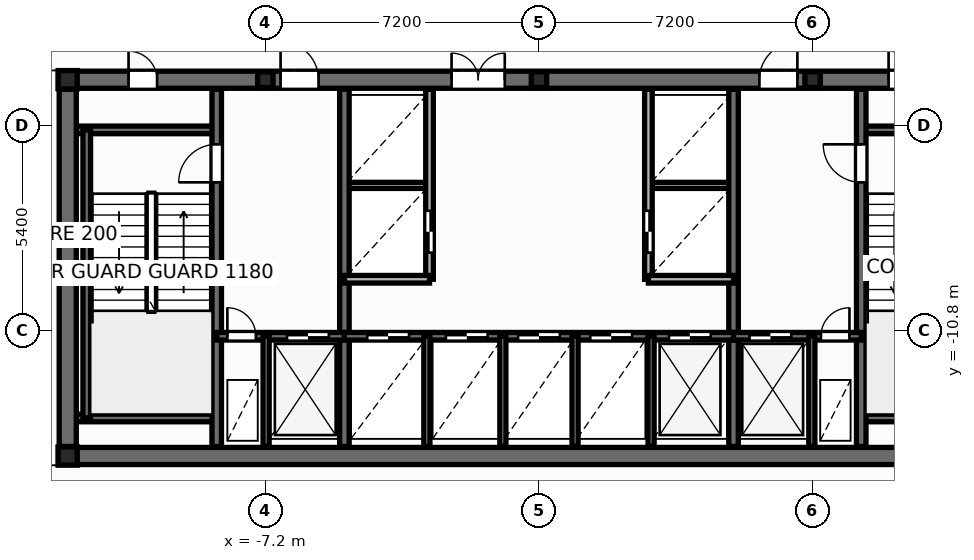
"""IFC4 building model, lengths in metres.
Left out: names, types, materials, properties, quantities, classifications, styles, units other than length and angle.
Written with IfcOpenShell. Run it as: python <this file> out.ifc"""

import sys

from ifc_helpers import new_model, si_unit, direction, frame, frame_2d, origin, origin_2d, place, context, subcontext, project, spatial, rectangle, i_section, extrude, element, fill, save


model = new_model("IFC4")
c1 = context("Model", 3, precision=1e-05, world=origin(), true_north=direction((0.0, 1.0)))
c2 = subcontext(c1, "Body", "Model", "MODEL_VIEW")
j1 = project(units=[si_unit("LENGTHUNIT", "METRE"), si_unit("PLANEANGLEUNIT", "RADIAN")], contexts=[c1])
p1 = place(None, origin())
s1 = spatial("IfcSite", under=j1, at=p1, CompositionType="ELEMENT")
p2 = place(p1, origin())
s2 = spatial("IfcBuilding", under=s1, at=p2, CompositionType="ELEMENT")
p3 = place(p2, frame((0.0, 0.0, 5.4)))
s3 = spatial("IfcBuildingStorey", under=s2, at=p3, CompositionType="ELEMENT", Elevation=5.4)
for number, where, z_axis, x_axis in (
    (1, (-12.4, -14.1, 0.0), (0.0, 0.0, 1.0), (1.0, 0.0, 0.0)),
    (2, (-12.4, -4.2, 0.0), (0.0, 0.0, 1.0), (1.0, 0.0, 0.0)),
):
    element("IfcColumn", number, at=place(p3, frame(where, z_axis=z_axis, x_axis=x_axis)), inside=s3, PredefinedType="COLUMN", context=c2, shape_type="SweptSolid", body=[
        extrude(i_section(OverallWidth=0.5, OverallDepth=0.482, WebThickness=0.04, FlangeThickness=0.045, at=origin_2d()), origin(), (0.0, 0.0, 1.0), 4.5),
    ])
for number, where, z_axis, x_axis in (
    (3, (-7.2, -4.2, 0.0), (0.0, 0.0, 1.0), (1.0, 0.0, 0.0)),
    (4, (0.0, -4.2, 0.0), (0.0, 0.0, 1.0), (1.0, 0.0, 0.0)),
    (5, (7.2, -4.2, 0.0), (0.0, 0.0, 1.0), (1.0, 0.0, 0.0)),
):
    element("IfcColumn", number, at=place(p3, frame(where, z_axis=z_axis, x_axis=x_axis)), inside=s3, PredefinedType="PILASTER", context=c2, shape_type="SweptSolid", body=[
        extrude(i_section(OverallWidth=0.405, OverallDepth=0.414, WebThickness=0.022, FlangeThickness=0.032, at=origin_2d()), origin(), (0.0, 0.0, 1.0), 4.5),
    ])
for number, where, z_axis, x_axis in (
    (6, (-5.12, -6.98, 0.0), (0.0, 0.0, 1.0), (1.0, 0.0, 0.0)),
    (7, (2.88, -6.98, 0.0), (0.0, 0.0, 1.0), (1.0, 0.0, 0.0)),
):
    element("IfcWall", number, at=place(p3, frame(where, z_axis=z_axis, x_axis=x_axis)), inside=s3, PredefinedType="PARTITIONING", context=c2, shape_type="SweptSolid", body=[
        extrude(rectangle(XDim=2.24, YDim=0.16, at=frame_2d((1.12, 0.0))), origin(), (0.0, 0.0, 1.0), 4.22),
    ])
p4 = place(p3, frame((-12.65, -14.1, 0.0), z_axis=(0.0, 0.0, 1.0), x_axis=(1.0, 0.0, 0.0)))
e8 = element("IfcWall", 8, at=p4, inside=s3, PredefinedType="SHEAR", context=c2, shape_type="SweptSolid", body=[
    extrude(rectangle(XDim=25.3, YDim=0.45, at=frame_2d((12.65, 0.0))), origin(), (0.0, 0.0, 1.0), 4.5),
])
p5 = place(p3, frame((-12.65, -4.2, 0.0), z_axis=(0.0, 0.0, 1.0), x_axis=(1.0, 0.0, 0.0)))
e9 = element("IfcWall", 9, at=p5, inside=s3, PredefinedType="SHEAR", context=c2, shape_type="SweptSolid", body=[
    extrude(rectangle(XDim=25.3, YDim=0.45, at=frame_2d((12.65, 0.0))), origin(), (0.0, 0.0, 1.0), 4.5),
])
p6 = place(p5, frame((1.85, 0.0, 0.0)))
e10 = element("IfcOpeningElement", 10, at=p6, cuts=e9, PredefinedType="OPENING", context=c2, shape_type="SweptSolid", body=[
    extrude(rectangle(XDim=0.756, YDim=2.054, at=frame_2d((0.375, 1.027))), frame((0.0, 0.235, 0.0), z_axis=(0.0, -1.0, 0.0), x_axis=(1.0, 0.0, 0.0)), (0.0, 0.0, 1.0), 0.47),
])
p7 = place(p5, frame((21.85, 0.0, 0.0)))
e11 = element("IfcOpeningElement", 11, at=p7, cuts=e9, PredefinedType="OPENING", context=c2, shape_type="SweptSolid", body=[
    extrude(rectangle(XDim=0.756, YDim=2.054, at=frame_2d((0.375, 1.027))), frame((0.0, 0.235, 0.0), z_axis=(0.0, -1.0, 0.0), x_axis=(1.0, 0.0, 0.0)), (0.0, 0.0, 1.0), 0.47),
])
p8 = place(p5, frame((23.5, 0.0, 0.0)))
e12 = element("IfcOpeningElement", 12, at=p8, cuts=e9, PredefinedType="OPENING", context=c2, shape_type="SweptSolid", body=[
    extrude(rectangle(XDim=0.756, YDim=2.054, at=frame_2d((0.375, 1.027))), frame((0.0, 0.235, 0.0), z_axis=(0.0, -1.0, 0.0), x_axis=(1.0, 0.0, 0.0)), (0.0, 0.0, 1.0), 0.47),
])
p9 = place(p5, frame((5.85, 0.0, 0.0)))
e13 = element("IfcOpeningElement", 13, at=p9, cuts=e9, PredefinedType="OPENING", context=c2, shape_type="SweptSolid", body=[
    extrude(rectangle(XDim=1.006, YDim=2.104, at=frame_2d((0.5, 1.052))), frame((0.0, 0.235, 0.0), z_axis=(0.0, -1.0, 0.0), x_axis=(1.0, 0.0, 0.0)), (0.0, 0.0, 1.0), 0.47),
])
p10 = place(p5, frame((10.35, 0.0, 0.0)))
e14 = element("IfcOpeningElement", 14, at=p10, cuts=e9, PredefinedType="OPENING", context=c2, shape_type="SweptSolid", body=[
    extrude(rectangle(XDim=1.406, YDim=2.154, at=frame_2d((0.7, 1.077))), frame((0.0, 0.235, 0.0), z_axis=(0.0, -1.0, 0.0), x_axis=(1.0, 0.0, 0.0)), (0.0, 0.0, 1.0), 0.47),
])
p11 = place(p5, frame((18.45, 0.0, 0.0)))
e15 = element("IfcOpeningElement", 15, at=p11, cuts=e9, PredefinedType="OPENING", context=c2, shape_type="SweptSolid", body=[
    extrude(rectangle(XDim=1.006, YDim=2.104, at=frame_2d((0.5, 1.052))), frame((0.0, 0.235, 0.0), z_axis=(0.0, -1.0, 0.0), x_axis=(1.0, 0.0, 0.0)), (0.0, 0.0, 1.0), 0.47),
])
for number, where, z_axis, x_axis in (
    (16, (-12.35, -5.52, 0.0), (0.0, 0.0, 1.0), (1.0, 0.0, 0.0)),
    (17, (-12.35, -13.1, 0.0), (0.0, 0.0, 1.0), (1.0, 0.0, 0.0)),
):
    element("IfcWall", number, at=place(p3, frame(where, z_axis=z_axis, x_axis=x_axis)), inside=s3, PredefinedType="SOLIDWALL", context=c2, shape_type="SweptSolid", body=[
        extrude(rectangle(XDim=3.87, YDim=0.2, at=frame_2d((1.935, 0.0))), origin(), (0.0, 0.0, 1.0), 4.5),
    ])
p12 = place(p3, frame((-11.9, -13.1, 0.0), z_axis=(0.0, 0.0, 1.0), x_axis=(0.0, 1.0, 0.0)))
e18 = element("IfcWall", 18, at=p12, inside=s3, PredefinedType="SOLIDWALL", context=c2, shape_type="SweptSolid", body=[
    extrude(rectangle(XDim=7.58, YDim=0.2, at=frame_2d((3.79, 0.0))), origin(), (0.0, 0.0, 1.0), 4.5),
])
for number, where, z_axis, x_axis in (
    (19, (8.48, -5.52, 0.0), (0.0, 0.0, 1.0), (1.0, 0.0, 0.0)),
    (20, (8.48, -13.1, 0.0), (0.0, 0.0, 1.0), (1.0, 0.0, 0.0)),
):
    element("IfcWall", number, at=place(p3, frame(where, z_axis=z_axis, x_axis=x_axis)), inside=s3, PredefinedType="SOLIDWALL", context=c2, shape_type="SweptSolid", body=[
        extrude(rectangle(XDim=3.87, YDim=0.2, at=frame_2d((1.935, 0.0))), origin(), (0.0, 0.0, 1.0), 4.5),
    ])
p13 = place(p3, frame((-8.48, -13.85, 0.0), z_axis=(0.0, 0.0, 1.0), x_axis=(0.0, 1.0, 0.0)))
e21 = element("IfcWall", 21, at=p13, inside=s3, PredefinedType="SHEAR", context=c2, shape_type="SweptSolid", body=[
    extrude(rectangle(XDim=9.4, YDim=0.25, at=frame_2d((4.7, 0.0))), origin(), (0.0, 0.0, 1.0), 4.5),
])
p14 = place(p13, frame((6.95, 0.0, 0.0)))
e22 = element("IfcOpeningElement", 22, at=p14, cuts=e21, PredefinedType="OPENING", context=c2, shape_type="SweptSolid", body=[
    extrude(rectangle(XDim=1.006, YDim=2.104, at=frame_2d((0.5, 1.052))), frame((0.0, 0.135, 0.0), z_axis=(0.0, -1.0, 0.0), x_axis=(1.0, 0.0, 0.0)), (0.0, 0.0, 1.0), 0.27),
])
p15 = place(p3, frame((8.48, -13.85, 0.0), z_axis=(0.0, 0.0, 1.0), x_axis=(0.0, 1.0, 0.0)))
e23 = element("IfcWall", 23, at=p15, inside=s3, PredefinedType="SHEAR", context=c2, shape_type="SweptSolid", body=[
    extrude(rectangle(XDim=9.4, YDim=0.25, at=frame_2d((4.7, 0.0))), origin(), (0.0, 0.0, 1.0), 4.5),
])
p16 = place(p15, frame((6.95, 0.0, 0.0)))
e24 = element("IfcOpeningElement", 24, at=p16, cuts=e23, PredefinedType="OPENING", context=c2, shape_type="SweptSolid", body=[
    extrude(rectangle(XDim=1.006, YDim=2.104, at=frame_2d((0.5, 1.052))), frame((0.0, 0.135, 0.0), z_axis=(0.0, -1.0, 0.0), x_axis=(1.0, 0.0, 0.0)), (0.0, 0.0, 1.0), 0.27),
])
for number, where, z_axis, x_axis in (
    (25, (-5.12, -13.85, 0.0), (0.0, 0.0, 1.0), (0.0, 1.0, 0.0)),
    (26, (5.12, -13.85, 0.0), (0.0, 0.0, 1.0), (0.0, 1.0, 0.0)),
):
    element("IfcWall", number, at=place(p3, frame(where, z_axis=z_axis, x_axis=x_axis)), inside=s3, PredefinedType="SHEAR", context=c2, shape_type="SweptSolid", body=[
        extrude(rectangle(XDim=9.4, YDim=0.25, at=frame_2d((4.7, 0.0))), origin(), (0.0, 0.0, 1.0), 4.5),
    ])
p17 = place(p3, frame((-8.48, -10.95, 0.0), z_axis=(0.0, 0.0, 1.0), x_axis=(1.0, 0.0, 0.0)))
e27 = element("IfcWall", 27, at=p17, inside=s3, PredefinedType="SOLIDWALL", context=c2, shape_type="SweptSolid", body=[
    extrude(rectangle(XDim=3.36, YDim=0.2, at=frame_2d((1.68, 0.0))), origin(), (0.0, 0.0, 1.0), 4.5),
])
p18 = place(p17, frame((0.28, 0.0, 0.0)))
e28 = element("IfcOpeningElement", 28, at=p18, cuts=e27, PredefinedType="OPENING", context=c2, shape_type="SweptSolid", body=[
    extrude(rectangle(XDim=0.756, YDim=2.054, at=frame_2d((0.375, 1.027))), frame((0.0, 0.11, 0.0), z_axis=(0.0, -1.0, 0.0), x_axis=(1.0, 0.0, 0.0)), (0.0, 0.0, 1.0), 0.22),
])
p19 = place(p17, frame((1.85, 0.0, 0.0)))
e29 = element("IfcOpeningElement", 29, at=p19, cuts=e27, PredefinedType="OPENING", context=c2, shape_type="SweptSolid", body=[
    extrude(rectangle(XDim=1.106, YDim=2.104, at=frame_2d((0.55, 1.052))), frame((0.0, 0.11, 0.0), z_axis=(0.0, -1.0, 0.0), x_axis=(1.0, 0.0, 0.0)), (0.0, 0.0, 1.0), 0.22),
])
p20 = place(p3, frame((-5.12, -10.95, 0.0), z_axis=(0.0, 0.0, 1.0), x_axis=(1.0, 0.0, 0.0)))
e30 = element("IfcWall", 30, at=p20, inside=s3, PredefinedType="SOLIDWALL", context=c2, shape_type="SweptSolid", body=[
    extrude(rectangle(XDim=10.24, YDim=0.2, at=frame_2d((5.12, 0.0))), origin(), (0.0, 0.0, 1.0), 4.5),
])
p21 = place(p20, frame((0.6, 0.0, 0.0)))
e31 = element("IfcOpeningElement", 31, at=p21, cuts=e30, PredefinedType="OPENING", context=c2, shape_type="SweptSolid", body=[
    extrude(rectangle(XDim=1.106, YDim=2.104, at=frame_2d((0.55, 1.052))), frame((0.0, 0.11, 0.0), z_axis=(0.0, -1.0, 0.0), x_axis=(1.0, 0.0, 0.0)), (0.0, 0.0, 1.0), 0.22),
])
p22 = place(p20, frame((2.67, 0.0, 0.0)))
e32 = element("IfcOpeningElement", 32, at=p22, cuts=e30, PredefinedType="OPENING", context=c2, shape_type="SweptSolid", body=[
    extrude(rectangle(XDim=1.106, YDim=2.104, at=frame_2d((0.55, 1.052))), frame((0.0, 0.11, 0.0), z_axis=(0.0, -1.0, 0.0), x_axis=(1.0, 0.0, 0.0)), (0.0, 0.0, 1.0), 0.22),
])
p23 = place(p20, frame((4.57, 0.0, 0.0)))
e33 = element("IfcOpeningElement", 33, at=p23, cuts=e30, PredefinedType="OPENING", context=c2, shape_type="SweptSolid", body=[
    extrude(rectangle(XDim=1.106, YDim=2.104, at=frame_2d((0.55, 1.052))), frame((0.0, 0.11, 0.0), z_axis=(0.0, -1.0, 0.0), x_axis=(1.0, 0.0, 0.0)), (0.0, 0.0, 1.0), 0.22),
])
p24 = place(p20, frame((6.47, 0.0, 0.0)))
e34 = element("IfcOpeningElement", 34, at=p24, cuts=e30, PredefinedType="OPENING", context=c2, shape_type="SweptSolid", body=[
    extrude(rectangle(XDim=1.106, YDim=2.104, at=frame_2d((0.55, 1.052))), frame((0.0, 0.11, 0.0), z_axis=(0.0, -1.0, 0.0), x_axis=(1.0, 0.0, 0.0)), (0.0, 0.0, 1.0), 0.22),
])
p25 = place(p20, frame((8.54, 0.0, 0.0)))
e35 = element("IfcOpeningElement", 35, at=p25, cuts=e30, PredefinedType="OPENING", context=c2, shape_type="SweptSolid", body=[
    extrude(rectangle(XDim=1.106, YDim=2.104, at=frame_2d((0.55, 1.052))), frame((0.0, 0.11, 0.0), z_axis=(0.0, -1.0, 0.0), x_axis=(1.0, 0.0, 0.0)), (0.0, 0.0, 1.0), 0.22),
])
p26 = place(p3, frame((5.12, -10.95, 0.0), z_axis=(0.0, 0.0, 1.0), x_axis=(1.0, 0.0, 0.0)))
e36 = element("IfcWall", 36, at=p26, inside=s3, PredefinedType="SOLIDWALL", context=c2, shape_type="SweptSolid", body=[
    extrude(rectangle(XDim=3.36, YDim=0.2, at=frame_2d((1.68, 0.0))), origin(), (0.0, 0.0, 1.0), 4.5),
])
p27 = place(p26, frame((0.42, 0.0, 0.0)))
e37 = element("IfcOpeningElement", 37, at=p27, cuts=e36, PredefinedType="OPENING", context=c2, shape_type="SweptSolid", body=[
    extrude(rectangle(XDim=1.106, YDim=2.104, at=frame_2d((0.55, 1.052))), frame((0.0, 0.11, 0.0), z_axis=(0.0, -1.0, 0.0), x_axis=(1.0, 0.0, 0.0)), (0.0, 0.0, 1.0), 0.22),
])
p28 = place(p26, frame((2.3, 0.0, 0.0)))
e38 = element("IfcOpeningElement", 38, at=p28, cuts=e36, PredefinedType="OPENING", context=c2, shape_type="SweptSolid", body=[
    extrude(rectangle(XDim=0.756, YDim=2.054, at=frame_2d((0.375, 1.027))), frame((0.0, 0.11, 0.0), z_axis=(0.0, -1.0, 0.0), x_axis=(1.0, 0.0, 0.0)), (0.0, 0.0, 1.0), 0.22),
])
for number, where, z_axis, x_axis in (
    (39, (-7.18, -13.85, 0.0), (0.0, 0.0, 1.0), (0.0, 1.0, 0.0)),
    (40, (7.18, -13.85, 0.0), (0.0, 0.0, 1.0), (0.0, 1.0, 0.0)),
    (41, (-2.95, -13.85, 0.0), (0.0, 0.0, 1.0), (0.0, 1.0, 0.0)),
    (42, (2.95, -13.85, 0.0), (0.0, 0.0, 1.0), (0.0, 1.0, 0.0)),
):
    element("IfcWall", number, at=place(p3, frame(where, z_axis=z_axis, x_axis=x_axis)), inside=s3, PredefinedType="PARTITIONING", context=c2, shape_type="SweptSolid", body=[
        extrude(rectangle(XDim=2.9, YDim=0.16, at=frame_2d((1.45, 0.0))), origin(), (0.0, 0.0, 1.0), 3.245),
    ])
p29 = place(p3, frame((-12.4, -13.85, 0.0), z_axis=(0.0, 0.0, 1.0), x_axis=(0.0, 1.0, 0.0)))
e43 = element("IfcWall", 43, at=p29, inside=s3, PredefinedType="SHEAR", context=c2, shape_type="SweptSolid", body=[
    extrude(rectangle(XDim=9.4, YDim=0.45, at=frame_2d((4.7, 0.0))), origin(), (0.0, 0.0, 1.0), 4.5),
])
p30 = place(p3, frame((-2.88, -9.45, 0.0), z_axis=(0.0, 0.0, 1.0), x_axis=(0.0, 1.0, 0.0)))
e44 = element("IfcWall", 44, at=p30, inside=s3, PredefinedType="SOLIDWALL", context=c2, shape_type="SweptSolid", body=[
    extrude(rectangle(XDim=5.0, YDim=0.2, at=frame_2d((2.5, 0.0))), origin(), (0.0, 0.0, 1.0), 4.22),
])
p31 = place(p30, frame((0.7, 0.0, 0.0)))
e45 = element("IfcOpeningElement", 45, at=p31, cuts=e44, PredefinedType="OPENING", context=c2, shape_type="SweptSolid", body=[
    extrude(rectangle(XDim=1.106, YDim=2.104, at=frame_2d((0.55, 1.052))), frame((0.0, 0.11, 0.0), z_axis=(0.0, -1.0, 0.0), x_axis=(1.0, 0.0, 0.0)), (0.0, 0.0, 1.0), 0.22),
])
p32 = place(p3, frame((-5.12, -9.45, 0.0), z_axis=(0.0, 0.0, 1.0), x_axis=(1.0, 0.0, 0.0)))
e46 = element("IfcWall", 46, at=p32, inside=s3, PredefinedType="SOLIDWALL", context=c2, shape_type="SweptSolid", body=[
    extrude(rectangle(XDim=2.24, YDim=0.2, at=frame_2d((1.12, 0.0))), origin(), (0.0, 0.0, 1.0), 4.22),
])
p33 = place(p3, frame((2.88, -9.45, 0.0), z_axis=(0.0, 0.0, 1.0), x_axis=(0.0, 1.0, 0.0)))
e47 = element("IfcWall", 47, at=p33, inside=s3, PredefinedType="SOLIDWALL", context=c2, shape_type="SweptSolid", body=[
    extrude(rectangle(XDim=5.0, YDim=0.2, at=frame_2d((2.5, 0.0))), origin(), (0.0, 0.0, 1.0), 4.22),
])
p34 = place(p33, frame((0.7, 0.0, 0.0)))
e48 = element("IfcOpeningElement", 48, at=p34, cuts=e47, PredefinedType="OPENING", context=c2, shape_type="SweptSolid", body=[
    extrude(rectangle(XDim=1.106, YDim=2.104, at=frame_2d((0.55, 1.052))), frame((0.0, 0.11, 0.0), z_axis=(0.0, -1.0, 0.0), x_axis=(1.0, 0.0, 0.0)), (0.0, 0.0, 1.0), 0.22),
])
p35 = place(p3, frame((2.88, -9.45, 0.0), z_axis=(0.0, 0.0, 1.0), x_axis=(1.0, 0.0, 0.0)))
e49 = element("IfcWall", 49, at=p35, inside=s3, PredefinedType="SOLIDWALL", context=c2, shape_type="SweptSolid", body=[
    extrude(rectangle(XDim=2.24, YDim=0.2, at=frame_2d((1.12, 0.0))), origin(), (0.0, 0.0, 1.0), 4.22),
])
for number, where, z_axis, x_axis in (
    (50, (-0.95, -13.85, 0.0), (0.0, 0.0, 1.0), (0.0, 1.0, 0.0)),
    (51, (0.95, -13.85, 0.0), (0.0, 0.0, 1.0), (0.0, 1.0, 0.0)),
):
    element("IfcWall", number, at=place(p3, frame(where, z_axis=z_axis, x_axis=x_axis)), inside=s3, PredefinedType="PARTITIONING", context=c2, shape_type="SweptSolid", body=[
        extrude(rectangle(XDim=2.9, YDim=0.16, at=frame_2d((1.45, 0.0))), origin(), (0.0, 0.0, 1.0), 3.245),
    ])
p36 = place(p31, origin())
e52 = element("IfcDoor", 52, at=p36, inside=s3, OperationType="DOUBLE_DOOR_SLIDING", PredefinedType="DOOR", context=c2, shape_type="SweptSolid", body=[
    extrude(rectangle(XDim=1.1, YDim=2.1, at=frame_2d((0.55, 1.05))), frame((0.0, 0.025, 0.0), z_axis=(0.0, -1.0, 0.0), x_axis=(1.0, 0.0, 0.0)), (0.0, 0.0, 1.0), 0.05),
])
fill(e45, e52)
p37 = place(p34, origin())
e53 = element("IfcDoor", 53, at=p37, inside=s3, OperationType="DOUBLE_DOOR_SLIDING", PredefinedType="DOOR", context=c2, shape_type="SweptSolid", body=[
    extrude(rectangle(XDim=1.1, YDim=2.1, at=frame_2d((0.55, 1.05))), frame((0.0, 0.025, 0.0), z_axis=(0.0, -1.0, 0.0), x_axis=(1.0, 0.0, 0.0)), (0.0, 0.0, 1.0), 0.05),
])
fill(e48, e53)
p38 = place(p14, origin())
e54 = element("IfcDoor", 54, at=p38, inside=s3, OperationType="SINGLE_SWING_LEFT", PredefinedType="DOOR", context=c2, shape_type="SweptSolid", body=[
    extrude(rectangle(XDim=1.0, YDim=2.1, at=frame_2d((0.5, 1.05))), frame((0.0, 0.025, 0.0), z_axis=(0.0, -1.0, 0.0), x_axis=(1.0, 0.0, 0.0)), (0.0, 0.0, 1.0), 0.05),
])
fill(e22, e54)
p39 = place(p16, origin())
e55 = element("IfcDoor", 55, at=p39, inside=s3, OperationType="SINGLE_SWING_RIGHT", PredefinedType="DOOR", context=c2, shape_type="SweptSolid", body=[
    extrude(rectangle(XDim=1.0, YDim=2.1, at=frame_2d((0.5, 1.05))), frame((0.0, 0.025, 0.0), z_axis=(0.0, -1.0, 0.0), x_axis=(1.0, 0.0, 0.0)), (0.0, 0.0, 1.0), 0.05),
])
fill(e24, e55)
p40 = place(p18, origin())
e56 = element("IfcDoor", 56, at=p40, inside=s3, OperationType="SINGLE_SWING_LEFT", PredefinedType="DOOR", context=c2, shape_type="SweptSolid", body=[
    extrude(rectangle(XDim=0.75, YDim=2.05, at=frame_2d((0.375, 1.025))), frame((0.0, 0.025, 0.0), z_axis=(0.0, -1.0, 0.0), x_axis=(1.0, 0.0, 0.0)), (0.0, 0.0, 1.0), 0.05),
])
fill(e28, e56)
p41 = place(p19, origin())
e57 = element("IfcDoor", 57, at=p41, inside=s3, OperationType="DOUBLE_DOOR_SLIDING", PredefinedType="DOOR", context=c2, shape_type="SweptSolid", body=[
    extrude(rectangle(XDim=1.1, YDim=2.1, at=frame_2d((0.55, 1.05))), frame((0.0, 0.025, 0.0), z_axis=(0.0, -1.0, 0.0), x_axis=(1.0, 0.0, 0.0)), (0.0, 0.0, 1.0), 0.05),
])
fill(e29, e57)
p42 = place(p27, origin())
e58 = element("IfcDoor", 58, at=p42, inside=s3, OperationType="DOUBLE_DOOR_SLIDING", PredefinedType="DOOR", context=c2, shape_type="SweptSolid", body=[
    extrude(rectangle(XDim=1.1, YDim=2.1, at=frame_2d((0.55, 1.05))), frame((0.0, 0.025, 0.0), z_axis=(0.0, -1.0, 0.0), x_axis=(1.0, 0.0, 0.0)), (0.0, 0.0, 1.0), 0.05),
])
fill(e37, e58)
p43 = place(p28, origin())
e59 = element("IfcDoor", 59, at=p43, inside=s3, OperationType="SINGLE_SWING_RIGHT", PredefinedType="DOOR", context=c2, shape_type="SweptSolid", body=[
    extrude(rectangle(XDim=0.75, YDim=2.05, at=frame_2d((0.375, 1.025))), frame((0.0, 0.025, 0.0), z_axis=(0.0, -1.0, 0.0), x_axis=(1.0, 0.0, 0.0)), (0.0, 0.0, 1.0), 0.05),
])
fill(e38, e59)
p44 = place(p21, origin())
e60 = element("IfcDoor", 60, at=p44, inside=s3, OperationType="DOUBLE_DOOR_SLIDING", PredefinedType="DOOR", context=c2, shape_type="SweptSolid", body=[
    extrude(rectangle(XDim=1.1, YDim=2.1, at=frame_2d((0.55, 1.05))), frame((0.0, 0.025, 0.0), z_axis=(0.0, -1.0, 0.0), x_axis=(1.0, 0.0, 0.0)), (0.0, 0.0, 1.0), 0.05),
])
fill(e31, e60)
p45 = place(p22, origin())
e61 = element("IfcDoor", 61, at=p45, inside=s3, OperationType="DOUBLE_DOOR_SLIDING", PredefinedType="DOOR", context=c2, shape_type="SweptSolid", body=[
    extrude(rectangle(XDim=1.1, YDim=2.1, at=frame_2d((0.55, 1.05))), frame((0.0, 0.025, 0.0), z_axis=(0.0, -1.0, 0.0), x_axis=(1.0, 0.0, 0.0)), (0.0, 0.0, 1.0), 0.05),
])
fill(e32, e61)
p46 = place(p23, origin())
e62 = element("IfcDoor", 62, at=p46, inside=s3, OperationType="DOUBLE_DOOR_SLIDING", PredefinedType="DOOR", context=c2, shape_type="SweptSolid", body=[
    extrude(rectangle(XDim=1.1, YDim=2.1, at=frame_2d((0.55, 1.05))), frame((0.0, 0.025, 0.0), z_axis=(0.0, -1.0, 0.0), x_axis=(1.0, 0.0, 0.0)), (0.0, 0.0, 1.0), 0.05),
])
fill(e33, e62)
p47 = place(p24, origin())
e63 = element("IfcDoor", 63, at=p47, inside=s3, OperationType="DOUBLE_DOOR_SLIDING", PredefinedType="DOOR", context=c2, shape_type="SweptSolid", body=[
    extrude(rectangle(XDim=1.1, YDim=2.1, at=frame_2d((0.55, 1.05))), frame((0.0, 0.025, 0.0), z_axis=(0.0, -1.0, 0.0), x_axis=(1.0, 0.0, 0.0)), (0.0, 0.0, 1.0), 0.05),
])
fill(e34, e63)
p48 = place(p25, origin())
e64 = element("IfcDoor", 64, at=p48, inside=s3, OperationType="DOUBLE_DOOR_SLIDING", PredefinedType="DOOR", context=c2, shape_type="SweptSolid", body=[
    extrude(rectangle(XDim=1.1, YDim=2.1, at=frame_2d((0.55, 1.05))), frame((0.0, 0.025, 0.0), z_axis=(0.0, -1.0, 0.0), x_axis=(1.0, 0.0, 0.0)), (0.0, 0.0, 1.0), 0.05),
])
fill(e35, e64)
p49 = place(p6, origin())
e65 = element("IfcDoor", 65, at=p49, inside=s3, OperationType="SINGLE_SWING_LEFT", PredefinedType="DOOR", context=c2, shape_type="SweptSolid", body=[
    extrude(rectangle(XDim=0.75, YDim=2.05, at=frame_2d((0.375, 1.025))), frame((0.0, 0.025, 0.0), z_axis=(0.0, -1.0, 0.0), x_axis=(1.0, 0.0, 0.0)), (0.0, 0.0, 1.0), 0.05),
])
fill(e10, e65)
p50 = place(p7, origin())
e66 = element("IfcDoor", 66, at=p50, inside=s3, OperationType="SINGLE_SWING_LEFT", PredefinedType="DOOR", context=c2, shape_type="SweptSolid", body=[
    extrude(rectangle(XDim=0.75, YDim=2.05, at=frame_2d((0.375, 1.025))), frame((0.0, 0.025, 0.0), z_axis=(0.0, -1.0, 0.0), x_axis=(1.0, 0.0, 0.0)), (0.0, 0.0, 1.0), 0.05),
])
fill(e11, e66)
p51 = place(p9, origin())
e67 = element("IfcDoor", 67, at=p51, inside=s3, OperationType="SINGLE_SWING_LEFT", PredefinedType="DOOR", context=c2, shape_type="SweptSolid", body=[
    extrude(rectangle(XDim=1.0, YDim=2.1, at=frame_2d((0.5, 1.05))), frame((0.0, 0.025, 0.0), z_axis=(0.0, -1.0, 0.0), x_axis=(1.0, 0.0, 0.0)), (0.0, 0.0, 1.0), 0.05),
])
fill(e13, e67)
p52 = place(p10, origin())
e68 = element("IfcDoor", 68, at=p52, inside=s3, OperationType="DOUBLE_DOOR_SINGLE_SWING", PredefinedType="DOOR", context=c2, shape_type="SweptSolid", body=[
    extrude(rectangle(XDim=1.4, YDim=2.15, at=frame_2d((0.7, 1.075))), frame((0.0, 0.025, 0.0), z_axis=(0.0, -1.0, 0.0), x_axis=(1.0, 0.0, 0.0)), (0.0, 0.0, 1.0), 0.05),
])
fill(e14, e68)
p53 = place(p11, origin())
e69 = element("IfcDoor", 69, at=p53, inside=s3, OperationType="SINGLE_SWING_RIGHT", PredefinedType="DOOR", context=c2, shape_type="SweptSolid", body=[
    extrude(rectangle(XDim=1.0, YDim=2.1, at=frame_2d((0.5, 1.05))), frame((0.0, 0.025, 0.0), z_axis=(0.0, -1.0, 0.0), x_axis=(1.0, 0.0, 0.0)), (0.0, 0.0, 1.0), 0.05),
])
fill(e15, e69)
save(model, sys.argv[1])
